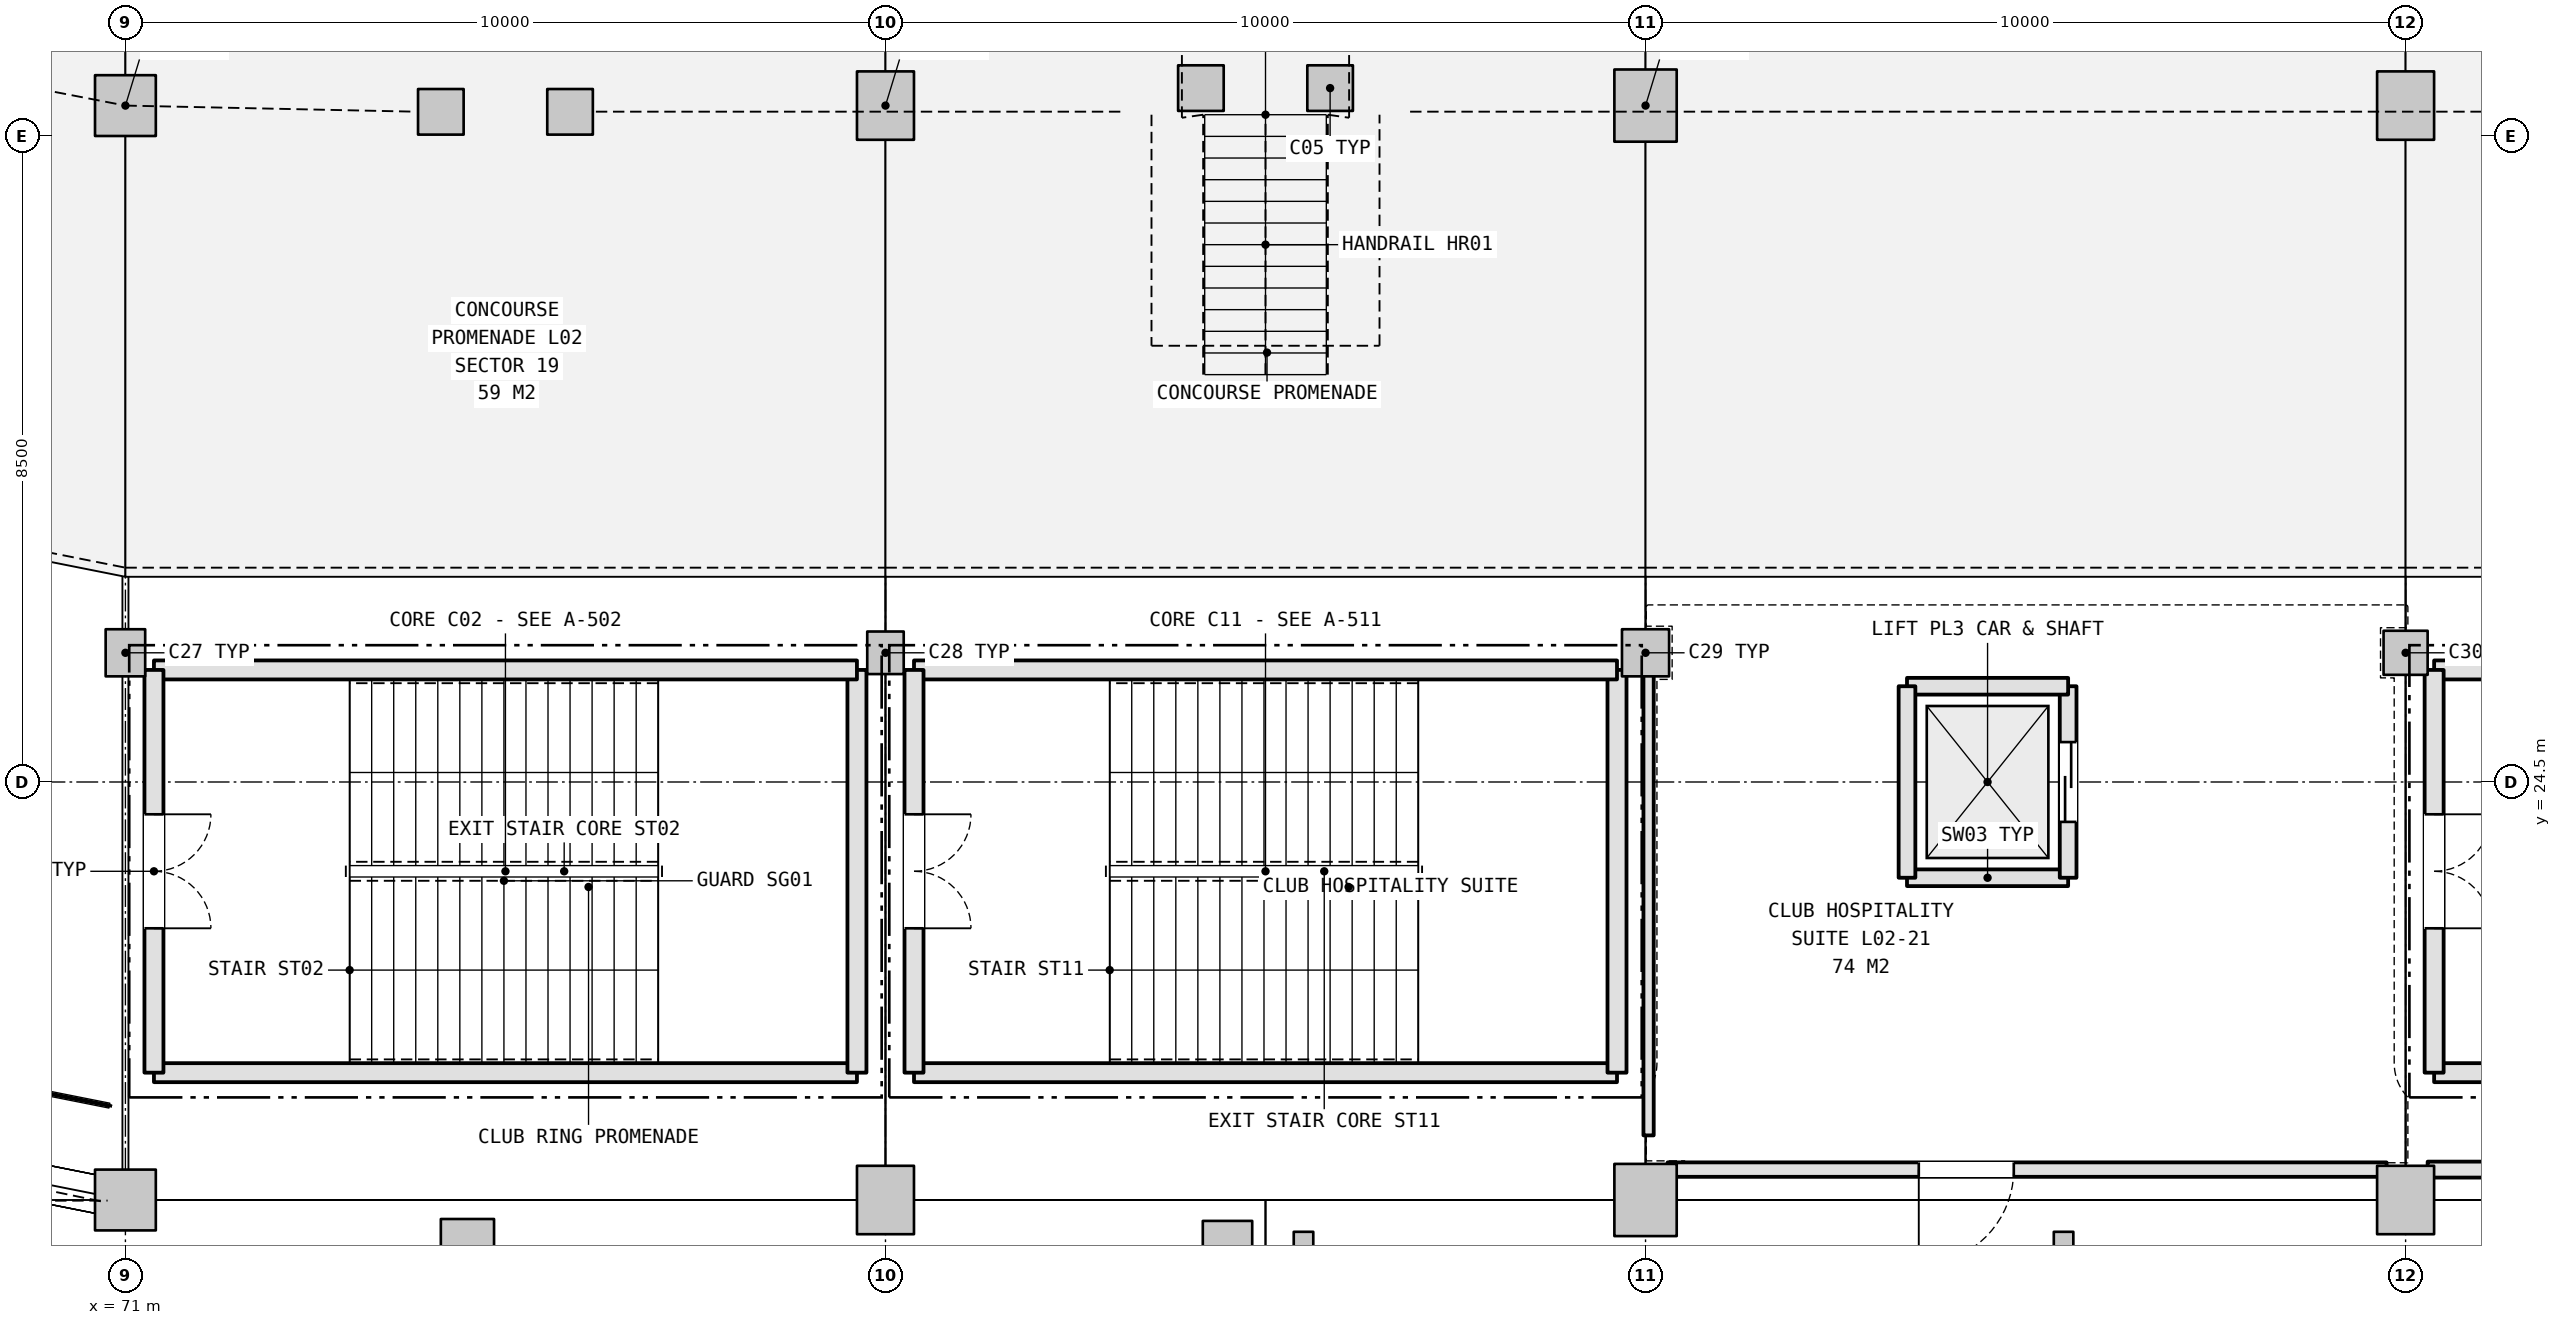
"""IFC4 building model, lengths in metres.
Left out: names, types, materials, properties, quantities, classifications, styles, units other than length and angle.
Written with IfcOpenShell. Run it as: python <this file> out.ifc"""

import sys

from ifc_helpers import new_model, si_unit, direction, frame, frame_2d, origin, origin_2d, place, context, subcontext, project, spatial, rectangle, i_section, extrude, element, fill, save


model = new_model("IFC4")
c1 = context("Model", 3, precision=1e-05, world=origin(), true_north=direction((0.0, 1.0)))
c2 = subcontext(c1, "Body", "Model", "MODEL_VIEW")
j1 = project(units=[si_unit("LENGTHUNIT", "METRE"), si_unit("PLANEANGLEUNIT", "RADIAN")], contexts=[c1])
p1 = place(None, origin())
s1 = spatial("IfcSite", under=j1, at=p1, CompositionType="ELEMENT")
p2 = place(p1, origin())
s2 = spatial("IfcBuilding", under=s1, at=p2, CompositionType="ELEMENT")
p3 = place(p2, frame((0.0, 0.0, 10.8)))
s3 = spatial("IfcBuildingStorey", under=s2, at=p3, CompositionType="ELEMENT", Elevation=10.8)
p4 = place(p3, frame((71.0, 33.4, 0.0), z_axis=(0.0, 0.0, 1.0), x_axis=(1.0, 0.0, 0.0)))
e1 = element("IfcColumn", 1, at=p4, inside=s3, PredefinedType="COLUMN", context=c2, shape_type="SweptSolid", body=[
    extrude(rectangle(XDim=0.8, YDim=0.8, at=origin_2d()), origin(), (0.0, 0.0, 1.0), 5.4),
])
p5 = place(p3, frame((71.0, 26.2, 0.0), z_axis=(0.0, 0.0, 1.0), x_axis=(1.0, 0.0, 0.0)))
e2 = element("IfcColumn", 2, at=p5, inside=s3, PredefinedType="COLUMN", context=c2, shape_type="SweptSolid", body=[
    extrude(rectangle(XDim=0.52, YDim=0.62, at=origin_2d()), origin(), (0.0, 0.0, 1.0), 5.4),
])
p6 = place(p3, frame((71.0, 19.0, 0.0), z_axis=(0.0, 0.0, 1.0), x_axis=(1.0, 0.0, 0.0)))
e3 = element("IfcColumn", 3, at=p6, inside=s3, PredefinedType="COLUMN", context=c2, shape_type="SweptSolid", body=[
    extrude(rectangle(XDim=0.8, YDim=0.8, at=origin_2d()), origin(), (0.0, 0.0, 1.0), 5.4),
])
p7 = place(p3, frame((81.0, 33.4, 0.0), z_axis=(0.0, 0.0, 1.0), x_axis=(1.0, 0.0, 0.0)))
e4 = element("IfcColumn", 4, at=p7, inside=s3, PredefinedType="COLUMN", context=c2, shape_type="SweptSolid", body=[
    extrude(rectangle(XDim=0.75, YDim=0.9, at=origin_2d()), origin(), (0.0, 0.0, 1.0), 5.4),
])
p8 = place(p3, frame((81.0, 26.2, 0.0), z_axis=(0.0, 0.0, 1.0), x_axis=(1.0, 0.0, 0.0)))
e5 = element("IfcColumn", 5, at=p8, inside=s3, PredefinedType="COLUMN", context=c2, shape_type="SweptSolid", body=[
    extrude(rectangle(XDim=0.48, YDim=0.56, at=origin_2d()), origin(), (0.0, 0.0, 1.0), 5.4),
])
p9 = place(p3, frame((81.0, 19.0, 0.0), z_axis=(0.0, 0.0, 1.0), x_axis=(1.0, 0.0, 0.0)))
e6 = element("IfcColumn", 6, at=p9, inside=s3, PredefinedType="COLUMN", context=c2, shape_type="SweptSolid", body=[
    extrude(rectangle(XDim=0.75, YDim=0.9, at=origin_2d()), origin(), (0.0, 0.0, 1.0), 5.4),
])
p10 = place(p3, frame((91.0, 33.4, 0.0), z_axis=(0.0, 0.0, 1.0), x_axis=(1.0, 0.0, 0.0)))
e7 = element("IfcColumn", 7, at=p10, inside=s3, PredefinedType="COLUMN", context=c2, shape_type="SweptSolid", body=[
    extrude(rectangle(XDim=0.82, YDim=0.95, at=origin_2d()), origin(), (0.0, 0.0, 1.0), 5.4),
])
p11 = place(p3, frame((91.0, 26.2, 0.0), z_axis=(0.0, 0.0, 1.0), x_axis=(1.0, 0.0, 0.0)))
e8 = element("IfcColumn", 8, at=p11, inside=s3, PredefinedType="COLUMN", context=c2, shape_type="SweptSolid", body=[
    extrude(rectangle(XDim=0.62, YDim=0.62, at=origin_2d()), origin(), (0.0, 0.0, 1.0), 5.4),
])
p12 = place(p3, frame((91.0, 19.0, 0.0), z_axis=(0.0, 0.0, 1.0), x_axis=(1.0, 0.0, 0.0)))
e9 = element("IfcColumn", 9, at=p12, inside=s3, PredefinedType="COLUMN", context=c2, shape_type="SweptSolid", body=[
    extrude(rectangle(XDim=0.82, YDim=0.95, at=origin_2d()), origin(), (0.0, 0.0, 1.0), 5.4),
])
p13 = place(p3, frame((101.0, 33.4, 0.0), z_axis=(0.0, 0.0, 1.0), x_axis=(1.0, 0.0, 0.0)))
e10 = element("IfcColumn", 10, at=p13, inside=s3, PredefinedType="COLUMN", context=c2, shape_type="SweptSolid", body=[
    extrude(rectangle(XDim=0.75, YDim=0.9, at=origin_2d()), origin(), (0.0, 0.0, 1.0), 5.4),
])
p14 = place(p3, frame((101.0, 26.2, 0.0), z_axis=(0.0, 0.0, 1.0), x_axis=(1.0, 0.0, 0.0)))
e11 = element("IfcColumn", 11, at=p14, inside=s3, PredefinedType="COLUMN", context=c2, shape_type="SweptSolid", body=[
    extrude(rectangle(XDim=0.58, YDim=0.58, at=origin_2d()), origin(), (0.0, 0.0, 1.0), 5.4),
])
p15 = place(p3, frame((101.0, 19.0, 0.0), z_axis=(0.0, 0.0, 1.0), x_axis=(1.0, 0.0, 0.0)))
e12 = element("IfcColumn", 12, at=p15, inside=s3, PredefinedType="COLUMN", context=c2, shape_type="SweptSolid", body=[
    extrude(rectangle(XDim=0.75, YDim=0.9, at=origin_2d()), origin(), (0.0, 0.0, 1.0), 5.4),
])
p16 = place(p3, frame((75.5, 18.4, 0.0), z_axis=(0.0, 0.0, 1.0), x_axis=(1.0, 0.0, 0.0)))
e13 = element("IfcColumn", 13, at=p16, inside=s3, PredefinedType="COLUMN", context=c2, shape_type="SweptSolid", body=[
    extrude(rectangle(XDim=0.7, YDim=0.7, at=origin_2d()), origin(), (0.0, 0.0, 1.0), 5.4),
])
p17 = place(p3, frame((85.5, 18.4, 0.0), z_axis=(0.0, 0.0, 1.0), x_axis=(1.0, 0.0, 0.0)))
e14 = element("IfcColumn", 14, at=p17, inside=s3, PredefinedType="COLUMN", context=c2, shape_type="SweptSolid", body=[
    extrude(rectangle(XDim=0.65, YDim=0.65, at=origin_2d()), origin(), (0.0, 0.0, 1.0), 5.4),
])
for number, where, z_axis, x_axis in (
    (15, (86.5, 18.4, 0.0), (0.0, 0.0, 1.0), (1.0, 0.0, 0.0)),
    (16, (96.5, 18.4, 0.0), (0.0, 0.0, 1.0), (1.0, 0.0, 0.0)),
):
    element("IfcColumn", number, at=place(p3, frame(where, z_axis=z_axis, x_axis=x_axis)), inside=s3, PredefinedType="COLUMN", context=c2, shape_type="SweptSolid", body=[
        extrude(i_section(OverallWidth=0.257, OverallDepth=0.363, WebThickness=0.013, FlangeThickness=0.022, FilletRadius=0.015, at=origin_2d()), origin(), (0.0, 0.0, 1.0), 5.4),
    ])
p18 = place(p3, frame((71.375, 20.675, 0.0), z_axis=(0.0, 0.0, 1.0), x_axis=(1.0, 0.0, 0.0)))
e17 = element("IfcWall", 17, at=p18, inside=s3, PredefinedType="SHEAR", context=c2, shape_type="SweptSolid", body=[
    extrude(rectangle(XDim=9.249, YDim=0.25, at=frame_2d((4.625, 0.0))), origin(), (0.0, 0.0, 1.0), 5.15),
])
p19 = place(p3, frame((80.625, 20.675, 0.0), z_axis=(0.0, 0.0, 1.0), x_axis=(0.0, 1.0, 0.0)))
e18 = element("IfcWall", 18, at=p19, inside=s3, PredefinedType="SHEAR", context=c2, shape_type="SweptSolid", body=[
    extrude(rectangle(XDim=5.299, YDim=0.25, at=frame_2d((2.65, 0.0))), origin(), (0.0, 0.0, 1.0), 5.15),
])
p20 = place(p3, frame((80.625, 25.975, 0.0), z_axis=(0.0, 0.0, 1.0), x_axis=(-1.0, 0.0, 0.0)))
e19 = element("IfcWall", 19, at=p20, inside=s3, PredefinedType="SHEAR", context=c2, shape_type="SweptSolid", body=[
    extrude(rectangle(XDim=9.249, YDim=0.25, at=frame_2d((4.625, 0.0))), origin(), (0.0, 0.0, 1.0), 5.15),
])
p21 = place(p3, frame((71.375, 25.975, 0.0), z_axis=(0.0, 0.0, 1.0), x_axis=(0.0, -1.0, 0.0)))
e20 = element("IfcWall", 20, at=p21, inside=s3, PredefinedType="SHEAR", context=c2, shape_type="SweptSolid", body=[
    extrude(rectangle(XDim=5.299, YDim=0.25, at=frame_2d((2.65, 0.0))), origin(), (0.0, 0.0, 1.0), 5.15),
])
p22 = place(p21, frame((1.9, 0.0, 0.0)))
e21 = element("IfcOpeningElement", 21, at=p22, cuts=e20, PredefinedType="OPENING", context=c2, shape_type="SweptSolid", body=[
    extrude(rectangle(XDim=1.5, YDim=2.2, at=frame_2d((0.75, 1.1))), frame((0.0, 0.135, 0.0), z_axis=(0.0, -1.0, 0.0), x_axis=(1.0, 0.0, 0.0)), (0.0, 0.0, 1.0), 0.27),
])
p23 = place(p3, frame((81.375, 20.675, 0.0), z_axis=(0.0, 0.0, 1.0), x_axis=(1.0, 0.0, 0.0)))
e22 = element("IfcWall", 22, at=p23, inside=s3, PredefinedType="SHEAR", context=c2, shape_type="SweptSolid", body=[
    extrude(rectangle(XDim=9.249, YDim=0.25, at=frame_2d((4.625, 0.0))), origin(), (0.0, 0.0, 1.0), 5.15),
])
p24 = place(p3, frame((90.625, 20.675, 0.0), z_axis=(0.0, 0.0, 1.0), x_axis=(0.0, 1.0, 0.0)))
e23 = element("IfcWall", 23, at=p24, inside=s3, PredefinedType="SHEAR", context=c2, shape_type="SweptSolid", body=[
    extrude(rectangle(XDim=5.299, YDim=0.25, at=frame_2d((2.65, 0.0))), origin(), (0.0, 0.0, 1.0), 5.15),
])
p25 = place(p3, frame((90.625, 25.975, 0.0), z_axis=(0.0, 0.0, 1.0), x_axis=(-1.0, 0.0, 0.0)))
e24 = element("IfcWall", 24, at=p25, inside=s3, PredefinedType="SHEAR", context=c2, shape_type="SweptSolid", body=[
    extrude(rectangle(XDim=9.249, YDim=0.25, at=frame_2d((4.625, 0.0))), origin(), (0.0, 0.0, 1.0), 5.15),
])
p26 = place(p3, frame((81.375, 25.975, 0.0), z_axis=(0.0, 0.0, 1.0), x_axis=(0.0, -1.0, 0.0)))
e25 = element("IfcWall", 25, at=p26, inside=s3, PredefinedType="SHEAR", context=c2, shape_type="SweptSolid", body=[
    extrude(rectangle(XDim=5.299, YDim=0.25, at=frame_2d((2.65, 0.0))), origin(), (0.0, 0.0, 1.0), 5.15),
])
p27 = place(p26, frame((1.9, 0.0, 0.0)))
e26 = element("IfcOpeningElement", 26, at=p27, cuts=e25, PredefinedType="OPENING", context=c2, shape_type="SweptSolid", body=[
    extrude(rectangle(XDim=1.5, YDim=2.2, at=frame_2d((0.75, 1.1))), frame((0.0, 0.135, 0.0), z_axis=(0.0, -1.0, 0.0), x_axis=(1.0, 0.0, 0.0)), (0.0, 0.0, 1.0), 0.27),
])
for number, where, z_axis, x_axis in (
    (27, (101.375, 20.675, 0.0), (0.0, 0.0, 1.0), (1.0, 0.0, 0.0)),
    (28, (110.625, 25.975, 0.0), (0.0, 0.0, 1.0), (-1.0, 0.0, 0.0)),
):
    element("IfcWall", number, at=place(p3, frame(where, z_axis=z_axis, x_axis=x_axis)), inside=s3, PredefinedType="SHEAR", context=c2, shape_type="SweptSolid", body=[
        extrude(rectangle(XDim=9.249, YDim=0.25, at=frame_2d((4.625, 0.0))), origin(), (0.0, 0.0, 1.0), 5.15),
    ])
p28 = place(p3, frame((101.375, 25.975, 0.0), z_axis=(0.0, 0.0, 1.0), x_axis=(0.0, -1.0, 0.0)))
e29 = element("IfcWall", 29, at=p28, inside=s3, PredefinedType="SHEAR", context=c2, shape_type="SweptSolid", body=[
    extrude(rectangle(XDim=5.299, YDim=0.25, at=frame_2d((2.65, 0.0))), origin(), (0.0, 0.0, 1.0), 5.15),
])
p29 = place(p28, frame((1.9, 0.0, 0.0)))
e30 = element("IfcOpeningElement", 30, at=p29, cuts=e29, PredefinedType="OPENING", context=c2, shape_type="SweptSolid", body=[
    extrude(rectangle(XDim=1.5, YDim=2.2, at=frame_2d((0.75, 1.1))), frame((0.0, 0.135, 0.0), z_axis=(0.0, -1.0, 0.0), x_axis=(1.0, 0.0, 0.0)), (0.0, 0.0, 1.0), 0.27),
])
for number, where, z_axis, x_axis in (
    (31, (86.85, 33.63, 0.0), (0.0, 0.0, 1.0), (1.0, 0.0, 0.0)),
    (32, (85.15, 33.63, 0.0), (0.0, 0.0, 1.0), (1.0, 0.0, 0.0)),
):
    element("IfcColumn", number, at=place(p3, frame(where, z_axis=z_axis, x_axis=x_axis)), inside=s3, PredefinedType="COLUMN", context=c2, shape_type="SweptSolid", body=[
        extrude(rectangle(XDim=0.6, YDim=0.6, at=origin_2d()), origin(), (0.0, 0.0, 1.0), 2.04),
    ])
for number, where, z_axis, x_axis in (
    (33, (76.85, 33.318, 0.0), (0.0, 0.0, 1.0), (1.0, 0.0, 0.0)),
    (34, (75.15, 33.318, 0.0), (0.0, 0.0, 1.0), (1.0, 0.0, 0.0)),
):
    element("IfcColumn", number, at=place(p3, frame(where, z_axis=z_axis, x_axis=x_axis)), inside=s3, PredefinedType="COLUMN", context=c2, shape_type="SweptSolid", body=[
        extrude(rectangle(XDim=0.6, YDim=0.6, at=origin_2d()), origin(), (0.0, 0.0, 1.0), 5.4),
    ])
p30 = place(p3, frame((94.44, 23.24, 0.0), z_axis=(0.0, 0.0, 1.0), x_axis=(1.0, 0.0, 0.0)))
e35 = element("IfcWall", 35, at=p30, inside=s3, PredefinedType="SHEAR", context=c2, shape_type="SweptSolid", body=[
    extrude(rectangle(XDim=2.12, YDim=0.22, at=frame_2d((1.06, 0.0))), origin(), (0.0, 0.0, 1.0), 5.15),
])
p31 = place(p3, frame((96.56, 23.24, 0.0), z_axis=(0.0, 0.0, 1.0), x_axis=(0.0, 1.0, 0.0)))
e36 = element("IfcWall", 36, at=p31, inside=s3, PredefinedType="SHEAR", context=c2, shape_type="SweptSolid", body=[
    extrude(rectangle(XDim=2.52, YDim=0.22, at=frame_2d((1.26, 0.0))), origin(), (0.0, 0.0, 1.0), 5.15),
])
p32 = place(p31, frame((0.735, 0.0, 0.0)))
e37 = element("IfcOpeningElement", 37, at=p32, cuts=e36, PredefinedType="OPENING", context=c2, shape_type="SweptSolid", body=[
    extrude(rectangle(XDim=1.05, YDim=2.15, at=frame_2d((0.525, 1.075))), frame((0.0, 0.12, 0.0), z_axis=(0.0, -1.0, 0.0), x_axis=(1.0, 0.0, 0.0)), (0.0, 0.0, 1.0), 0.24),
])
p33 = place(p3, frame((96.56, 25.76, 0.0), z_axis=(0.0, 0.0, 1.0), x_axis=(-1.0, 0.0, 0.0)))
e38 = element("IfcWall", 38, at=p33, inside=s3, PredefinedType="SHEAR", context=c2, shape_type="SweptSolid", body=[
    extrude(rectangle(XDim=2.12, YDim=0.22, at=frame_2d((1.06, 0.0))), origin(), (0.0, 0.0, 1.0), 5.15),
])
p34 = place(p3, frame((94.44, 25.76, 0.0), z_axis=(0.0, 0.0, 1.0), x_axis=(0.0, -1.0, 0.0)))
e39 = element("IfcWall", 39, at=p34, inside=s3, PredefinedType="SHEAR", context=c2, shape_type="SweptSolid", body=[
    extrude(rectangle(XDim=2.52, YDim=0.22, at=frame_2d((1.26, 0.0))), origin(), (0.0, 0.0, 1.0), 5.15),
])
p35 = place(p3, frame((100.75, 19.4, 0.0), z_axis=(0.0, 0.0, 1.0), x_axis=(-1.0, 0.0, 0.0)))
e40 = element("IfcWall", 40, at=p35, inside=s3, PredefinedType="PARTITIONING", context=c2, shape_type="SweptSolid", body=[
    extrude(rectangle(XDim=9.46, YDim=0.19, at=frame_2d((4.73, 0.0))), origin(), (0.0, 0.0, 1.0), 4.215),
])
p36 = place(p35, frame((4.905, 0.0, 0.0)))
e41 = element("IfcOpeningElement", 41, at=p36, cuts=e40, PredefinedType="OPENING", context=c2, shape_type="SweptSolid", body=[
    extrude(rectangle(XDim=1.25, YDim=2.2, at=frame_2d((0.625, 1.1))), frame((0.0, 0.105, 0.0), z_axis=(0.0, -1.0, 0.0), x_axis=(1.0, 0.0, 0.0)), (0.0, 0.0, 1.0), 0.21),
])
p37 = place(p3, frame((91.04, 19.85, 0.0), z_axis=(0.0, 0.0, 1.0), x_axis=(0.0, 1.0, 0.0)))
e42 = element("IfcWall", 42, at=p37, inside=s3, PredefinedType="PARTITIONING", context=c2, shape_type="SweptSolid", body=[
    extrude(rectangle(XDim=6.5, YDim=0.135, at=frame_2d((3.25, 0.0))), origin(), (0.0, 0.0, 1.0), 4.285),
])
p38 = place(p3, frame((110.75, 19.4, 0.0), z_axis=(0.0, 0.0, 1.0), x_axis=(-1.0, 0.0, 0.0)))
e43 = element("IfcWall", 43, at=p38, inside=s3, PredefinedType="PLUMBINGWALL", context=c2, shape_type="SweptSolid", body=[
    extrude(rectangle(XDim=9.46, YDim=0.21, at=frame_2d((4.73, 0.0))), origin(), (0.0, 0.0, 1.0), 4.215),
])
p39 = place(p38, frame((7.47, 0.0, 0.0)))
e44 = element("IfcOpeningElement", 44, at=p39, cuts=e43, PredefinedType="OPENING", context=c2, shape_type="SweptSolid", body=[
    extrude(rectangle(XDim=0.92, YDim=2.1, at=frame_2d((0.46, 1.05))), frame((0.0, 0.115, 0.0), z_axis=(0.0, -1.0, 0.0), x_axis=(1.0, 0.0, 0.0)), (0.0, 0.0, 1.0), 0.23),
])
p40 = place(p22, origin())
e45 = element("IfcDoor", 45, at=p40, inside=s3, OperationType="DOUBLE_DOOR_SINGLE_SWING", PredefinedType="DOOR", context=c2, shape_type="SweptSolid", body=[
    extrude(rectangle(XDim=1.5, YDim=2.2, at=frame_2d((0.75, 1.1))), frame((0.0, 0.025, 0.0), z_axis=(0.0, -1.0, 0.0), x_axis=(1.0, 0.0, 0.0)), (0.0, 0.0, 1.0), 0.05),
])
fill(e21, e45)
p41 = place(p27, origin())
e46 = element("IfcDoor", 46, at=p41, inside=s3, OperationType="DOUBLE_DOOR_SINGLE_SWING", PredefinedType="DOOR", context=c2, shape_type="SweptSolid", body=[
    extrude(rectangle(XDim=1.5, YDim=2.2, at=frame_2d((0.75, 1.1))), frame((0.0, 0.025, 0.0), z_axis=(0.0, -1.0, 0.0), x_axis=(1.0, 0.0, 0.0)), (0.0, 0.0, 1.0), 0.05),
])
fill(e26, e46)
p42 = place(p29, origin())
e47 = element("IfcDoor", 47, at=p42, inside=s3, OperationType="DOUBLE_DOOR_SINGLE_SWING", PredefinedType="DOOR", context=c2, shape_type="SweptSolid", body=[
    extrude(rectangle(XDim=1.5, YDim=2.2, at=frame_2d((0.75, 1.1))), frame((0.0, 0.025, 0.0), z_axis=(0.0, -1.0, 0.0), x_axis=(1.0, 0.0, 0.0)), (0.0, 0.0, 1.0), 0.05),
])
fill(e30, e47)
p43 = place(p32, origin())
e48 = element("IfcDoor", 48, at=p43, inside=s3, OperationType="DOUBLE_DOOR_SLIDING", PredefinedType="DOOR", context=c2, shape_type="SweptSolid", body=[
    extrude(rectangle(XDim=1.05, YDim=2.15, at=frame_2d((0.525, 1.075))), frame((0.0, 0.025, 0.0), z_axis=(0.0, -1.0, 0.0), x_axis=(1.0, 0.0, 0.0)), (0.0, 0.0, 1.0), 0.05),
])
fill(e37, e48)
p44 = place(p36, origin())
e49 = element("IfcDoor", 49, at=p44, inside=s3, OperationType="SINGLE_SWING_RIGHT", PredefinedType="DOOR", context=c2, shape_type="SweptSolid", body=[
    extrude(rectangle(XDim=1.25, YDim=2.2, at=frame_2d((0.625, 1.1))), frame((0.0, 0.025, 0.0), z_axis=(0.0, -1.0, 0.0), x_axis=(1.0, 0.0, 0.0)), (0.0, 0.0, 1.0), 0.05),
])
fill(e41, e49)
save(model, sys.argv[1])
